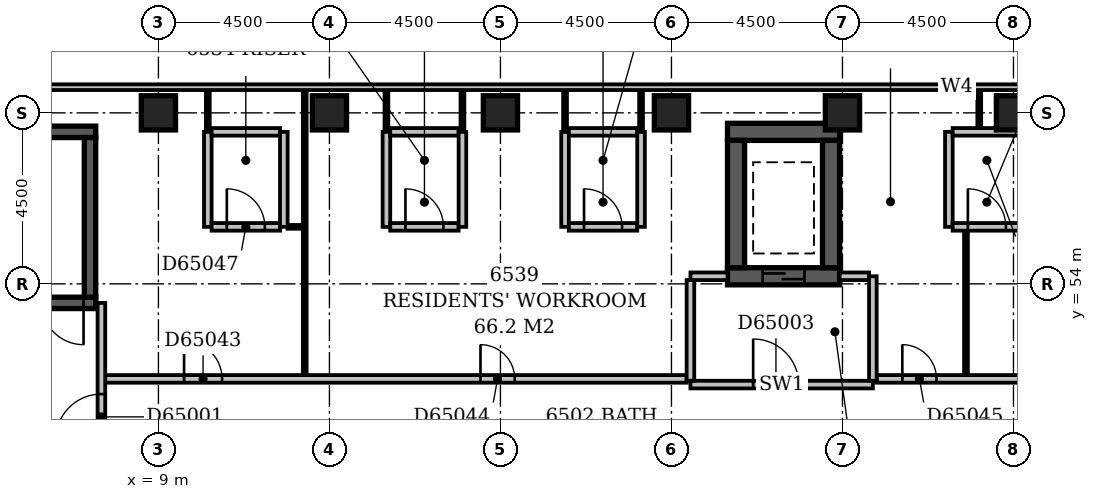
"""IFC4 building model, lengths in metres.
Left out: names, types, materials, properties, quantities, classifications, styles, units other than length and angle.
Written with IfcOpenShell. Run it as: python <this file> out.ifc"""

import sys

from ifc_helpers import new_model, si_unit, direction, frame, frame_2d, origin, origin_2d, place, context, subcontext, project, spatial, rectangle, extrude, element, fill, save


model = new_model("IFC4")
c1 = context("Model", 3, precision=1e-05, world=origin(), true_north=direction((0.0, 1.0)))
c2 = subcontext(c1, "Body", "Model", "MODEL_VIEW")
j1 = project(units=[si_unit("LENGTHUNIT", "METRE"), si_unit("PLANEANGLEUNIT", "RADIAN")], contexts=[c1])
p1 = place(None, origin())
s1 = spatial("IfcSite", under=j1, at=p1, CompositionType="ELEMENT")
p2 = place(p1, origin())
s2 = spatial("IfcBuilding", under=s1, at=p2, CompositionType="ELEMENT")
p3 = place(p2, frame((0.0, 0.0, 251.0)))
s3 = spatial("IfcBuildingStorey", under=s2, at=p3, CompositionType="ELEMENT", Elevation=251.0)
p4 = place(p3, frame((0.35, 53.5, -0.3), z_axis=(0.0, 0.0, 1.0), x_axis=(1.0, 0.0, 0.0)))
e1 = element("IfcWall", 1, at=p4, inside=s3, PredefinedType="SHEAR", context=c2, shape_type="SweptSolid", body=[
    extrude(rectangle(XDim=7.0, YDim=0.3, at=frame_2d((3.5, 0.0))), origin(), (0.0, 0.0, 1.0), 3.6),
])
p5 = place(p4, frame((5.58, 0.0, 0.3)))
e2 = element("IfcOpeningElement", 2, at=p5, cuts=e1, PredefinedType="OPENING", context=c2, shape_type="SweptSolid", body=[
    extrude(rectangle(XDim=1.1, YDim=2.1, at=frame_2d((0.55, 1.05))), frame((0.0, 0.162, 0.0), z_axis=(0.0, -1.0, 0.0), x_axis=(1.0, 0.0, 0.0)), (0.0, 0.0, 1.0), 0.324),
])
p6 = place(p3, frame((0.35, 58.0, -0.3), z_axis=(0.0, 0.0, 1.0), x_axis=(1.0, 0.0, 0.0)))
e3 = element("IfcWall", 3, at=p6, inside=s3, PredefinedType="SHEAR", context=c2, shape_type="SweptSolid", body=[
    extrude(rectangle(XDim=7.0, YDim=0.3, at=frame_2d((3.5, 0.0))), origin(), (0.0, 0.0, 1.0), 3.6),
])
p7 = place(p3, frame((7.2, 53.65, -0.3), z_axis=(0.0, 0.0, 1.0), x_axis=(0.0, 1.0, 0.0)))
e4 = element("IfcWall", 4, at=p7, inside=s3, PredefinedType="SHEAR", context=c2, shape_type="SweptSolid", body=[
    extrude(rectangle(XDim=4.2, YDim=0.3, at=frame_2d((2.1, 0.0))), origin(), (0.0, 0.0, 1.0), 3.6),
])
p8 = place(p3, frame((23.975, 54.2, -0.3), z_axis=(0.0, 0.0, 1.0), x_axis=(1.0, 0.0, 0.0)))
e5 = element("IfcWall", 5, at=p8, inside=s3, PredefinedType="SHEAR", context=c2, shape_type="SweptSolid", body=[
    extrude(rectangle(XDim=2.95, YDim=0.45, at=frame_2d((1.475, 0.0))), origin(), (0.0, 0.0, 1.0), 3.6),
])
p9 = place(p8, frame((0.925, 0.0, 0.3)))
e6 = element("IfcOpeningElement", 6, at=p9, cuts=e5, PredefinedType="OPENING", context=c2, shape_type="SweptSolid", body=[
    extrude(rectangle(XDim=1.1, YDim=2.1, at=frame_2d((0.55, 1.05))), frame((0.0, 0.237, 0.0), z_axis=(0.0, -1.0, 0.0), x_axis=(1.0, 0.0, 0.0)), (0.0, 0.0, 1.0), 0.474),
])
p10 = place(p3, frame((23.975, 58.0, -0.3), z_axis=(0.0, 0.0, 1.0), x_axis=(1.0, 0.0, 0.0)))
e7 = element("IfcWall", 7, at=p10, inside=s3, PredefinedType="SHEAR", context=c2, shape_type="SweptSolid", body=[
    extrude(rectangle(XDim=2.95, YDim=0.45, at=frame_2d((1.475, 0.0))), origin(), (0.0, 0.0, 1.0), 3.6),
])
for number, where, z_axis, x_axis in (
    (8, (24.2, 54.425, -0.3), (0.0, 0.0, 1.0), (0.0, 1.0, 0.0)),
    (9, (26.7, 54.425, -0.3), (0.0, 0.0, 1.0), (0.0, 1.0, 0.0)),
):
    element("IfcWall", number, at=place(p3, frame(where, z_axis=z_axis, x_axis=x_axis)), inside=s3, PredefinedType="SHEAR", context=c2, shape_type="SweptSolid", body=[
        extrude(rectangle(XDim=3.35, YDim=0.45, at=frame_2d((1.675, 0.0))), origin(), (0.0, 0.0, 1.0), 3.6),
    ])
for number, where, z_axis, x_axis in (
    (10, (9.0, 58.5, -0.3), (0.0, 0.0, 1.0), (1.0, 0.0, 0.0)),
    (11, (13.5, 58.5, -0.3), (0.0, 0.0, 1.0), (1.0, 0.0, 0.0)),
    (12, (18.0, 58.5, -0.3), (0.0, 0.0, 1.0), (1.0, 0.0, 0.0)),
    (13, (22.5, 58.5, -0.3), (0.0, 0.0, 1.0), (1.0, 0.0, 0.0)),
    (14, (27.0, 58.5, -0.3), (0.0, 0.0, 1.0), (1.0, 0.0, 0.0)),
    (15, (31.5, 58.5, -0.3), (0.0, 0.0, 1.0), (1.0, 0.0, 0.0)),
):
    element("IfcColumn", number, at=place(p3, frame(where, z_axis=z_axis, x_axis=x_axis)), inside=s3, PredefinedType="COLUMN", context=c2, shape_type="SweptSolid", body=[
        extrude(rectangle(XDim=0.9, YDim=0.9, at=origin_2d()), origin(), (0.0, 0.0, 1.0), 3.6),
    ])
p11 = place(p3, frame((45.6, 59.175, 0.0), z_axis=(0.0, 0.0, 1.0), x_axis=(-1.0, 0.0, 0.0)))
e16 = element("IfcWall", 16, at=p11, inside=s3, PredefinedType="STANDARD", context=c2, shape_type="SweptSolid", body=[
    extrude(rectangle(XDim=46.35, YDim=0.15, at=frame_2d((23.175, 0.0))), origin(), (0.0, 0.0, 1.0), 2.7),
])
p12 = place(p11, frame((15.287, 0.0, 0.6)))
e17 = element("IfcOpeningElement", 17, at=p12, cuts=e16, PredefinedType="OPENING", context=c2, shape_type="SweptSolid", body=[
    extrude(rectangle(XDim=0.6, YDim=1.8, at=frame_2d((0.3, 0.9))), frame((0.0, 0.087, 0.0), z_axis=(0.0, -1.0, 0.0), x_axis=(1.0, 0.0, 0.0)), (0.0, 0.0, 1.0), 0.174),
])
p13 = place(p3, frame((23.0, 51.35, 0.0), z_axis=(0.0, 0.0, 1.0), x_axis=(1.0, 0.0, 0.0)))
e18 = element("IfcWall", 18, at=p13, inside=s3, PredefinedType="PARTITIONING", context=c2, shape_type="SweptSolid", body=[
    extrude(rectangle(XDim=4.8, YDim=0.2, at=frame_2d((2.4, 0.0))), origin(), (0.0, 0.0, 1.0), 3.3),
])
p14 = place(p13, frame((1.65, 0.0, 0.0)))
e19 = element("IfcOpeningElement", 19, at=p14, cuts=e18, PredefinedType="OPENING", context=c2, shape_type="SweptSolid", body=[
    extrude(rectangle(XDim=1.2, YDim=2.1, at=frame_2d((0.6, 1.05))), frame((0.0, 0.112, 0.0), z_axis=(0.0, -1.0, 0.0), x_axis=(1.0, 0.0, 0.0)), (0.0, 0.0, 1.0), 0.224),
])
p15 = place(p3, frame((27.8, 51.45, 0.0), z_axis=(0.0, 0.0, 1.0), x_axis=(0.0, 1.0, 0.0)))
e20 = element("IfcWall", 20, at=p15, inside=s3, PredefinedType="PARTITIONING", context=c2, shape_type="SweptSolid", body=[
    extrude(rectangle(XDim=2.75, YDim=0.2, at=frame_2d((1.375, 0.0))), origin(), (0.0, 0.0, 1.0), 3.3),
])
p16 = place(p3, frame((23.0, 54.2, 0.0), z_axis=(0.0, 0.0, 1.0), x_axis=(1.0, 0.0, 0.0)))
e21 = element("IfcWall", 21, at=p16, inside=s3, PredefinedType="PARTITIONING", context=c2, shape_type="SweptSolid", body=[
    extrude(rectangle(XDim=0.975, YDim=0.2, at=frame_2d((0.488, 0.0))), origin(), (0.0, 0.0, 1.0), 3.3),
])
p17 = place(p3, frame((26.925, 54.2, 0.0), z_axis=(0.0, 0.0, 1.0), x_axis=(1.0, 0.0, 0.0)))
e22 = element("IfcWall", 22, at=p17, inside=s3, PredefinedType="PARTITIONING", context=c2, shape_type="SweptSolid", body=[
    extrude(rectangle(XDim=0.775, YDim=0.2, at=frame_2d((0.387, 0.0))), origin(), (0.0, 0.0, 1.0), 3.3),
])
p18 = place(p3, frame((23.0, 51.45, 0.0), z_axis=(0.0, 0.0, 1.0), x_axis=(0.0, 1.0, 0.0)))
e23 = element("IfcWall", 23, at=p18, inside=s3, PredefinedType="PARTITIONING", context=c2, shape_type="SweptSolid", body=[
    extrude(rectangle(XDim=2.65, YDim=0.2, at=frame_2d((1.325, 0.0))), origin(), (0.0, 0.0, 1.0), 3.3),
])
p19 = place(p3, frame((7.5, 49.6, 0.0), z_axis=(0.0, 0.0, 1.0), x_axis=(0.0, 1.0, 0.0)))
e24 = element("IfcWall", 24, at=p19, inside=s3, PredefinedType="PARTITIONING", context=c2, shape_type="SweptSolid", body=[
    extrude(rectangle(XDim=3.9, YDim=0.2, at=frame_2d((1.95, 0.0))), origin(), (0.0, 0.0, 1.0), 3.3),
])
p20 = place(p19, frame((0.3, 0.0, 0.0)))
e25 = element("IfcOpeningElement", 25, at=p20, cuts=e24, PredefinedType="OPENING", context=c2, shape_type="SweptSolid", body=[
    extrude(rectangle(XDim=1.2, YDim=2.1, at=frame_2d((0.6, 1.05))), frame((0.0, 0.112, 0.0), z_axis=(0.0, -1.0, 0.0), x_axis=(1.0, 0.0, 0.0)), (0.0, 0.0, 1.0), 0.224),
])
p21 = place(p3, frame((7.6, 51.5, 0.0), z_axis=(0.0, 0.0, 1.0), x_axis=(1.0, 0.0, 0.0)))
e26 = element("IfcWall", 26, at=p21, inside=s3, PredefinedType="PARTITIONING", context=c2, shape_type="SweptSolid", body=[
    extrude(rectangle(XDim=15.3, YDim=0.2, at=frame_2d((7.65, 0.0))), origin(), (0.0, 0.0, 1.0), 3.3),
])
p22 = place(p21, frame((2.075, 0.0, 0.0)))
e27 = element("IfcOpeningElement", 27, at=p22, cuts=e26, PredefinedType="OPENING", context=c2, shape_type="SweptSolid", body=[
    extrude(rectangle(XDim=1.0, YDim=2.1, at=frame_2d((0.5, 1.05))), frame((0.0, 0.112, 0.0), z_axis=(0.0, -1.0, 0.0), x_axis=(1.0, 0.0, 0.0)), (0.0, 0.0, 1.0), 0.224),
])
p23 = place(p21, frame((9.875, 0.0, 0.0)))
e28 = element("IfcOpeningElement", 28, at=p23, cuts=e26, PredefinedType="OPENING", context=c2, shape_type="SweptSolid", body=[
    extrude(rectangle(XDim=0.9, YDim=2.1, at=frame_2d((0.45, 1.05))), frame((0.0, 0.112, 0.0), z_axis=(0.0, -1.0, 0.0), x_axis=(1.0, 0.0, 0.0)), (0.0, 0.0, 1.0), 0.224),
])
p24 = place(p3, frame((27.9, 51.5, 0.0), z_axis=(0.0, 0.0, 1.0), x_axis=(1.0, 0.0, 0.0)))
e29 = element("IfcWall", 29, at=p24, inside=s3, PredefinedType="PARTITIONING", context=c2, shape_type="SweptSolid", body=[
    extrude(rectangle(XDim=9.3, YDim=0.2, at=frame_2d((4.65, 0.0))), origin(), (0.0, 0.0, 1.0), 3.3),
])
p25 = place(p24, frame((0.675, 0.0, 0.0)))
e30 = element("IfcOpeningElement", 30, at=p25, cuts=e29, PredefinedType="OPENING", context=c2, shape_type="SweptSolid", body=[
    extrude(rectangle(XDim=0.9, YDim=2.1, at=frame_2d((0.45, 1.05))), frame((0.0, 0.112, 0.0), z_axis=(0.0, -1.0, 0.0), x_axis=(1.0, 0.0, 0.0)), (0.0, 0.0, 1.0), 0.224),
])
p26 = place(p24, frame((5.375, 0.0, 0.0)))
e31 = element("IfcOpeningElement", 31, at=p26, cuts=e29, PredefinedType="OPENING", context=c2, shape_type="SweptSolid", body=[
    extrude(rectangle(XDim=1.0, YDim=2.1, at=frame_2d((0.5, 1.05))), frame((0.0, 0.112, 0.0), z_axis=(0.0, -1.0, 0.0), x_axis=(1.0, 0.0, 0.0)), (0.0, 0.0, 1.0), 0.224),
])
p27 = place(p3, frame((12.85, 51.6, 0.0), z_axis=(0.0, 0.0, 1.0), x_axis=(0.0, 1.0, 0.0)))
e32 = element("IfcWall", 32, at=p27, inside=s3, PredefinedType="PARTITIONING", context=c2, shape_type="SweptSolid", body=[
    extrude(rectangle(XDim=7.5, YDim=0.1, at=frame_2d((3.75, 0.0))), origin(), (0.0, 0.0, 1.0), 3.3),
])
p28 = place(p3, frame((30.25, 51.6, 0.0), z_axis=(0.0, 0.0, 1.0), x_axis=(0.0, 1.0, 0.0)))
e33 = element("IfcWall", 33, at=p28, inside=s3, PredefinedType="PARTITIONING", context=c2, shape_type="SweptSolid", body=[
    extrude(rectangle(XDim=3.8, YDim=0.1, at=frame_2d((1.9, 0.0))), origin(), (0.0, 0.0, 1.0), 3.3),
])
p29 = place(p3, frame((10.3, 55.5, 0.0), z_axis=(0.0, 0.0, 1.0), x_axis=(0.0, 1.0, 0.0)))
e34 = element("IfcWall", 34, at=p29, inside=s3, PredefinedType="PARTITIONING", context=c2, shape_type="SweptSolid", body=[
    extrude(rectangle(XDim=2.5, YDim=0.2, at=frame_2d((1.25, 0.0))), origin(), (0.0, 0.0, 1.0), 3.3),
])
p30 = place(p3, frame((10.4, 55.5, 0.0), z_axis=(0.0, 0.0, 1.0), x_axis=(1.0, 0.0, 0.0)))
e35 = element("IfcWall", 35, at=p30, inside=s3, PredefinedType="PARTITIONING", context=c2, shape_type="SweptSolid", body=[
    extrude(rectangle(XDim=1.8, YDim=0.2, at=frame_2d((0.9, 0.0))), origin(), (0.0, 0.0, 1.0), 3.3),
])
p31 = place(p30, frame((0.4, 0.0, 0.0)))
e36 = element("IfcOpeningElement", 36, at=p31, cuts=e35, PredefinedType="OPENING", context=c2, shape_type="SweptSolid", body=[
    extrude(rectangle(XDim=1.0, YDim=2.1, at=frame_2d((0.5, 1.05))), frame((0.0, 0.112, 0.0), z_axis=(0.0, -1.0, 0.0), x_axis=(1.0, 0.0, 0.0)), (0.0, 0.0, 1.0), 0.224),
])
p32 = place(p3, frame((12.3, 55.5, 0.0), z_axis=(0.0, 0.0, 1.0), x_axis=(0.0, 1.0, 0.0)))
e37 = element("IfcWall", 37, at=p32, inside=s3, PredefinedType="PARTITIONING", context=c2, shape_type="SweptSolid", body=[
    extrude(rectangle(XDim=2.5, YDim=0.2, at=frame_2d((1.25, 0.0))), origin(), (0.0, 0.0, 1.0), 3.3),
])
p33 = place(p3, frame((12.4, 55.5, 0.0), z_axis=(0.0, 0.0, 1.0), x_axis=(1.0, 0.0, 0.0)))
e38 = element("IfcWall", 38, at=p33, inside=s3, PredefinedType="PARTITIONING", context=c2, shape_type="SweptSolid", body=[
    extrude(rectangle(XDim=0.4, YDim=0.1, at=frame_2d((0.2, 0.0))), origin(), (0.0, 0.0, 1.0), 3.3),
])
p34 = place(p3, frame((15.0, 55.5, 0.0), z_axis=(0.0, 0.0, 1.0), x_axis=(0.0, 1.0, 0.0)))
e39 = element("IfcWall", 39, at=p34, inside=s3, PredefinedType="PARTITIONING", context=c2, shape_type="SweptSolid", body=[
    extrude(rectangle(XDim=2.5, YDim=0.2, at=frame_2d((1.25, 0.0))), origin(), (0.0, 0.0, 1.0), 3.3),
])
p35 = place(p3, frame((15.1, 55.5, 0.0), z_axis=(0.0, 0.0, 1.0), x_axis=(1.0, 0.0, 0.0)))
e40 = element("IfcWall", 40, at=p35, inside=s3, PredefinedType="PARTITIONING", context=c2, shape_type="SweptSolid", body=[
    extrude(rectangle(XDim=1.8, YDim=0.2, at=frame_2d((0.9, 0.0))), origin(), (0.0, 0.0, 1.0), 3.3),
])
p36 = place(p35, frame((0.4, 0.0, 0.0)))
e41 = element("IfcOpeningElement", 41, at=p36, cuts=e40, PredefinedType="OPENING", context=c2, shape_type="SweptSolid", body=[
    extrude(rectangle(XDim=1.0, YDim=2.1, at=frame_2d((0.5, 1.05))), frame((0.0, 0.112, 0.0), z_axis=(0.0, -1.0, 0.0), x_axis=(1.0, 0.0, 0.0)), (0.0, 0.0, 1.0), 0.224),
])
for number, where, z_axis, x_axis in (
    (42, (17.0, 55.5, 0.0), (0.0, 0.0, 1.0), (0.0, 1.0, 0.0)),
    (43, (19.7, 55.5, 0.0), (0.0, 0.0, 1.0), (0.0, 1.0, 0.0)),
):
    element("IfcWall", number, at=place(p3, frame(where, z_axis=z_axis, x_axis=x_axis)), inside=s3, PredefinedType="PARTITIONING", context=c2, shape_type="SweptSolid", body=[
        extrude(rectangle(XDim=2.5, YDim=0.2, at=frame_2d((1.25, 0.0))), origin(), (0.0, 0.0, 1.0), 3.3),
    ])
p37 = place(p3, frame((19.8, 55.5, 0.0), z_axis=(0.0, 0.0, 1.0), x_axis=(1.0, 0.0, 0.0)))
e44 = element("IfcWall", 44, at=p37, inside=s3, PredefinedType="PARTITIONING", context=c2, shape_type="SweptSolid", body=[
    extrude(rectangle(XDim=1.8, YDim=0.2, at=frame_2d((0.9, 0.0))), origin(), (0.0, 0.0, 1.0), 3.3),
])
p38 = place(p37, frame((0.4, 0.0, 0.0)))
e45 = element("IfcOpeningElement", 45, at=p38, cuts=e44, PredefinedType="OPENING", context=c2, shape_type="SweptSolid", body=[
    extrude(rectangle(XDim=1.0, YDim=2.1, at=frame_2d((0.5, 1.05))), frame((0.0, 0.112, 0.0), z_axis=(0.0, -1.0, 0.0), x_axis=(1.0, 0.0, 0.0)), (0.0, 0.0, 1.0), 0.224),
])
for number, where, z_axis, x_axis in (
    (46, (21.7, 55.5, 0.0), (0.0, 0.0, 1.0), (0.0, 1.0, 0.0)),
    (47, (29.8, 55.5, 0.0), (0.0, 0.0, 1.0), (0.0, 1.0, 0.0)),
):
    element("IfcWall", number, at=place(p3, frame(where, z_axis=z_axis, x_axis=x_axis)), inside=s3, PredefinedType="PARTITIONING", context=c2, shape_type="SweptSolid", body=[
        extrude(rectangle(XDim=2.5, YDim=0.2, at=frame_2d((1.25, 0.0))), origin(), (0.0, 0.0, 1.0), 3.3),
    ])
p39 = place(p3, frame((29.9, 55.5, 0.0), z_axis=(0.0, 0.0, 1.0), x_axis=(1.0, 0.0, 0.0)))
e48 = element("IfcWall", 48, at=p39, inside=s3, PredefinedType="PARTITIONING", context=c2, shape_type="SweptSolid", body=[
    extrude(rectangle(XDim=1.8, YDim=0.2, at=frame_2d((0.9, 0.0))), origin(), (0.0, 0.0, 1.0), 3.3),
])
p40 = place(p39, frame((0.4, 0.0, 0.0)))
e49 = element("IfcOpeningElement", 49, at=p40, cuts=e48, PredefinedType="OPENING", context=c2, shape_type="SweptSolid", body=[
    extrude(rectangle(XDim=1.0, YDim=2.1, at=frame_2d((0.5, 1.05))), frame((0.0, 0.112, 0.0), z_axis=(0.0, -1.0, 0.0), x_axis=(1.0, 0.0, 0.0)), (0.0, 0.0, 1.0), 0.224),
])
p41 = place(p3, frame((10.3, 58.0, 0.0), z_axis=(0.0, 0.0, 1.0), x_axis=(0.0, 1.0, 0.0)))
e50 = element("IfcWall", 50, at=p41, inside=s3, PredefinedType="PARTITIONING", context=c2, shape_type="SweptSolid", body=[
    extrude(rectangle(XDim=1.1, YDim=0.1, at=frame_2d((0.55, 0.0))), origin(), (0.0, 0.0, 1.0), 3.3),
])
p42 = place(p3, frame((10.4, 58.0, 0.0), z_axis=(0.0, 0.0, 1.0), x_axis=(1.0, 0.0, 0.0)))
e51 = element("IfcWall", 51, at=p42, inside=s3, PredefinedType="PARTITIONING", context=c2, shape_type="SweptSolid", body=[
    extrude(rectangle(XDim=1.8, YDim=0.2, at=frame_2d((0.9, 0.0))), origin(), (0.0, 0.0, 1.0), 3.3),
])
p43 = place(p3, frame((15.0, 58.0, 0.0), z_axis=(0.0, 0.0, 1.0), x_axis=(0.0, 1.0, 0.0)))
e52 = element("IfcWall", 52, at=p43, inside=s3, PredefinedType="PARTITIONING", context=c2, shape_type="SweptSolid", body=[
    extrude(rectangle(XDim=1.1, YDim=0.1, at=frame_2d((0.55, 0.0))), origin(), (0.0, 0.0, 1.0), 3.3),
])
p44 = place(p3, frame((15.1, 58.0, 0.0), z_axis=(0.0, 0.0, 1.0), x_axis=(1.0, 0.0, 0.0)))
e53 = element("IfcWall", 53, at=p44, inside=s3, PredefinedType="PARTITIONING", context=c2, shape_type="SweptSolid", body=[
    extrude(rectangle(XDim=1.8, YDim=0.2, at=frame_2d((0.9, 0.0))), origin(), (0.0, 0.0, 1.0), 3.3),
])
for number, where, z_axis, x_axis in (
    (54, (17.0, 58.0, 0.0), (0.0, 0.0, 1.0), (0.0, 1.0, 0.0)),
    (55, (19.7, 58.0, 0.0), (0.0, 0.0, 1.0), (0.0, 1.0, 0.0)),
):
    element("IfcWall", number, at=place(p3, frame(where, z_axis=z_axis, x_axis=x_axis)), inside=s3, PredefinedType="PARTITIONING", context=c2, shape_type="SweptSolid", body=[
        extrude(rectangle(XDim=1.1, YDim=0.1, at=frame_2d((0.55, 0.0))), origin(), (0.0, 0.0, 1.0), 3.3),
    ])
p45 = place(p3, frame((19.8, 58.0, 0.0), z_axis=(0.0, 0.0, 1.0), x_axis=(1.0, 0.0, 0.0)))
e56 = element("IfcWall", 56, at=p45, inside=s3, PredefinedType="PARTITIONING", context=c2, shape_type="SweptSolid", body=[
    extrude(rectangle(XDim=1.8, YDim=0.2, at=frame_2d((0.9, 0.0))), origin(), (0.0, 0.0, 1.0), 3.3),
])
p46 = place(p3, frame((21.7, 58.0, 0.0), z_axis=(0.0, 0.0, 1.0), x_axis=(0.0, 1.0, 0.0)))
e57 = element("IfcWall", 57, at=p46, inside=s3, PredefinedType="PARTITIONING", context=c2, shape_type="SweptSolid", body=[
    extrude(rectangle(XDim=1.1, YDim=0.1, at=frame_2d((0.55, 0.0))), origin(), (0.0, 0.0, 1.0), 3.3),
])
p47 = place(p3, frame((29.9, 58.0, 0.0), z_axis=(0.0, 0.0, 1.0), x_axis=(1.0, 0.0, 0.0)))
e58 = element("IfcWall", 58, at=p47, inside=s3, PredefinedType="PARTITIONING", context=c2, shape_type="SweptSolid", body=[
    extrude(rectangle(XDim=1.8, YDim=0.2, at=frame_2d((0.9, 0.0))), origin(), (0.0, 0.0, 1.0), 3.3),
])
p48 = place(p3, frame((30.6, 58.1, 0.0), z_axis=(0.0, 0.0, 1.0), x_axis=(0.0, 1.0, 0.0)))
e59 = element("IfcWall", 59, at=p48, inside=s3, PredefinedType="PARTITIONING", context=c2, shape_type="SweptSolid", body=[
    extrude(rectangle(XDim=1.0, YDim=0.1, at=frame_2d((0.5, 0.0))), origin(), (0.0, 0.0, 1.0), 3.3),
])
p49 = place(p12, origin())
e60 = element("IfcWindow", 60, at=p49, inside=s3, PartitioningType="SINGLE_PANEL", PredefinedType="WINDOW", context=c2, shape_type="SweptSolid", body=[
    extrude(rectangle(XDim=0.6, YDim=1.8, at=frame_2d((0.3, 0.9))), frame((0.0, 0.03, 0.0), z_axis=(0.0, -1.0, 0.0), x_axis=(1.0, 0.0, 0.0)), (0.0, 0.0, 1.0), 0.06),
])
fill(e17, e60)
p50 = place(p20, origin())
e61 = element("IfcDoor", 61, at=p50, inside=s3, OperationType="SINGLE_SWING_LEFT", PredefinedType="DOOR", context=c2, shape_type="SweptSolid", body=[
    extrude(rectangle(XDim=1.2, YDim=2.1, at=frame_2d((0.6, 1.05))), frame((0.0, 0.025, 0.0), z_axis=(0.0, -1.0, 0.0), x_axis=(1.0, 0.0, 0.0)), (0.0, 0.0, 1.0), 0.05),
])
fill(e25, e61)
p51 = place(p14, origin())
e62 = element("IfcDoor", 62, at=p51, inside=s3, OperationType="SINGLE_SWING_LEFT", PredefinedType="DOOR", context=c2, shape_type="SweptSolid", body=[
    extrude(rectangle(XDim=1.2, YDim=2.1, at=frame_2d((0.6, 1.05))), frame((0.0, 0.025, 0.0), z_axis=(0.0, -1.0, 0.0), x_axis=(1.0, 0.0, 0.0)), (0.0, 0.0, 1.0), 0.05),
])
fill(e19, e62)
p52 = place(p9, origin())
e63 = element("IfcDoor", 63, at=p52, inside=s3, OperationType="SLIDING_TO_LEFT", PredefinedType="DOOR", context=c2, shape_type="SweptSolid", body=[
    extrude(rectangle(XDim=1.1, YDim=2.1, at=frame_2d((0.55, 1.05))), frame((0.0, 0.025, 0.0), z_axis=(0.0, -1.0, 0.0), x_axis=(1.0, 0.0, 0.0)), (0.0, 0.0, 1.0), 0.05),
])
fill(e6, e63)
p53 = place(p5, origin())
e64 = element("IfcDoor", 64, at=p53, inside=s3, OperationType="SINGLE_SWING_RIGHT", PredefinedType="DOOR", context=c2, shape_type="SweptSolid", body=[
    extrude(rectangle(XDim=1.1, YDim=2.1, at=frame_2d((0.55, 1.05))), frame((0.0, 0.025, 0.0), z_axis=(0.0, -1.0, 0.0), x_axis=(1.0, 0.0, 0.0)), (0.0, 0.0, 1.0), 0.05),
])
fill(e2, e64)
p54 = place(p22, origin())
e65 = element("IfcDoor", 65, at=p54, inside=s3, OperationType="SINGLE_SWING_LEFT", PredefinedType="DOOR", context=c2, shape_type="SweptSolid", body=[
    extrude(rectangle(XDim=1.0, YDim=2.1, at=frame_2d((0.5, 1.05))), frame((0.0, 0.025, 0.0), z_axis=(0.0, -1.0, 0.0), x_axis=(1.0, 0.0, 0.0)), (0.0, 0.0, 1.0), 0.05),
])
fill(e27, e65)
p55 = place(p23, origin())
e66 = element("IfcDoor", 66, at=p55, inside=s3, OperationType="SINGLE_SWING_LEFT", PredefinedType="DOOR", context=c2, shape_type="SweptSolid", body=[
    extrude(rectangle(XDim=0.9, YDim=2.1, at=frame_2d((0.45, 1.05))), frame((0.0, 0.025, 0.0), z_axis=(0.0, -1.0, 0.0), x_axis=(1.0, 0.0, 0.0)), (0.0, 0.0, 1.0), 0.05),
])
fill(e28, e66)
p56 = place(p25, origin())
e67 = element("IfcDoor", 67, at=p56, inside=s3, OperationType="SINGLE_SWING_LEFT", PredefinedType="DOOR", context=c2, shape_type="SweptSolid", body=[
    extrude(rectangle(XDim=0.9, YDim=2.1, at=frame_2d((0.45, 1.05))), frame((0.0, 0.025, 0.0), z_axis=(0.0, -1.0, 0.0), x_axis=(1.0, 0.0, 0.0)), (0.0, 0.0, 1.0), 0.05),
])
fill(e30, e67)
p57 = place(p31, origin())
e68 = element("IfcDoor", 68, at=p57, inside=s3, OperationType="SINGLE_SWING_LEFT", PredefinedType="DOOR", context=c2, shape_type="SweptSolid", body=[
    extrude(rectangle(XDim=1.0, YDim=2.1, at=frame_2d((0.5, 1.05))), frame((0.0, 0.025, 0.0), z_axis=(0.0, -1.0, 0.0), x_axis=(1.0, 0.0, 0.0)), (0.0, 0.0, 1.0), 0.05),
])
fill(e36, e68)
p58 = place(p36, origin())
e69 = element("IfcDoor", 69, at=p58, inside=s3, OperationType="SINGLE_SWING_LEFT", PredefinedType="DOOR", context=c2, shape_type="SweptSolid", body=[
    extrude(rectangle(XDim=1.0, YDim=2.1, at=frame_2d((0.5, 1.05))), frame((0.0, 0.025, 0.0), z_axis=(0.0, -1.0, 0.0), x_axis=(1.0, 0.0, 0.0)), (0.0, 0.0, 1.0), 0.05),
])
fill(e41, e69)
p59 = place(p38, origin())
e70 = element("IfcDoor", 70, at=p59, inside=s3, OperationType="SINGLE_SWING_LEFT", PredefinedType="DOOR", context=c2, shape_type="SweptSolid", body=[
    extrude(rectangle(XDim=1.0, YDim=2.1, at=frame_2d((0.5, 1.05))), frame((0.0, 0.025, 0.0), z_axis=(0.0, -1.0, 0.0), x_axis=(1.0, 0.0, 0.0)), (0.0, 0.0, 1.0), 0.05),
])
fill(e45, e70)
p60 = place(p40, origin())
e71 = element("IfcDoor", 71, at=p60, inside=s3, OperationType="SINGLE_SWING_LEFT", PredefinedType="DOOR", context=c2, shape_type="SweptSolid", body=[
    extrude(rectangle(XDim=1.0, YDim=2.1, at=frame_2d((0.5, 1.05))), frame((0.0, 0.025, 0.0), z_axis=(0.0, -1.0, 0.0), x_axis=(1.0, 0.0, 0.0)), (0.0, 0.0, 1.0), 0.05),
])
fill(e49, e71)
save(model, sys.argv[1])
